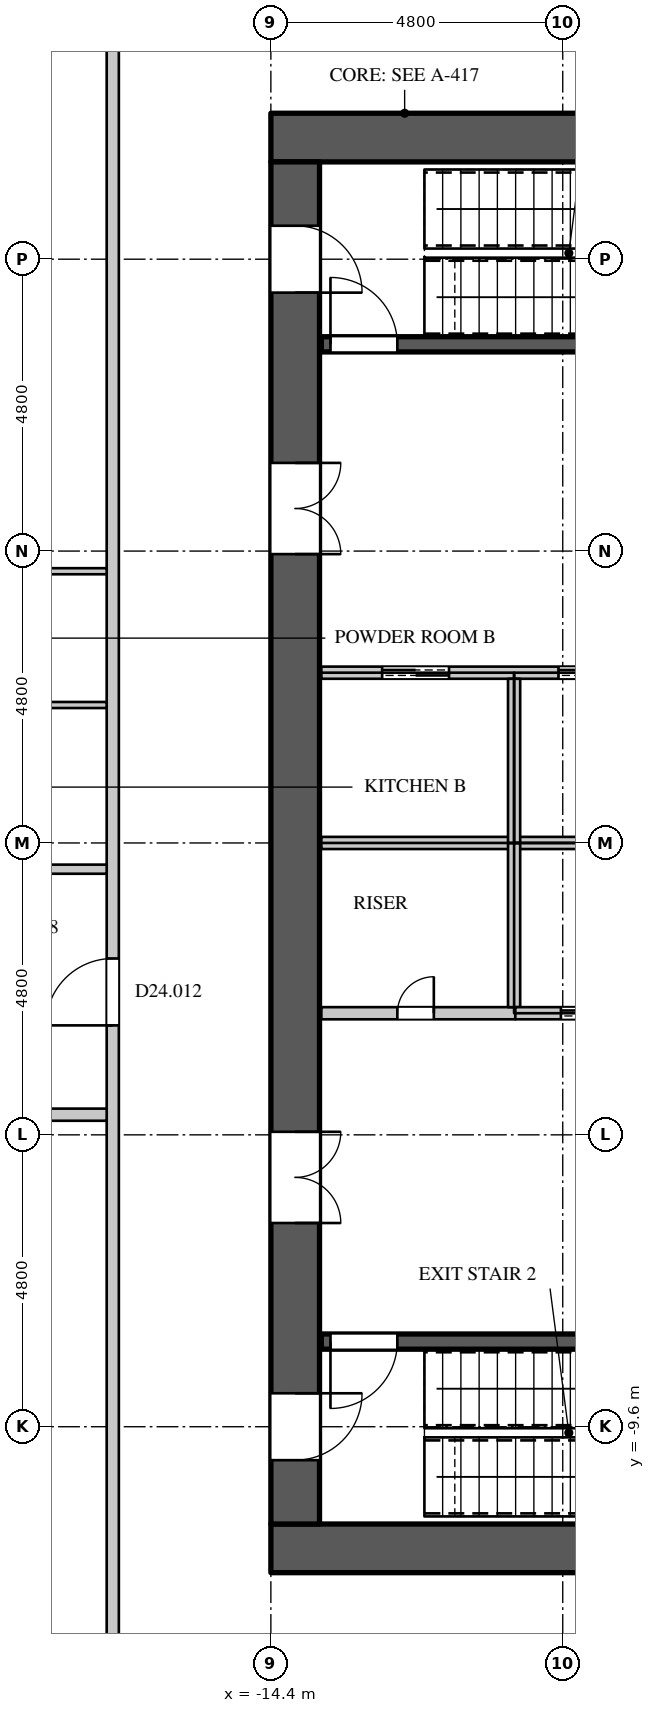
"""IFC4 building model, lengths in metres.
Left out: names, types, materials, properties, quantities, classifications, styles, units other than length and angle.
Written with IfcOpenShell. Run it as: python <this file> out.ifc"""

import sys

from ifc_helpers import new_model, si_unit, direction, frame, frame_2d, origin, place, context, subcontext, project, spatial, rectangle, extrude, element, fill, save


model = new_model("IFC4")
c1 = context("Model", 3, precision=1e-05, world=origin(), true_north=direction((0.0, 1.0)))
c2 = subcontext(c1, "Body", "Model", "MODEL_VIEW")
j1 = project(units=[si_unit("LENGTHUNIT", "METRE"), si_unit("PLANEANGLEUNIT", "RADIAN")], contexts=[c1])
p1 = place(None, origin())
s1 = spatial("IfcSite", under=j1, at=p1, CompositionType="ELEMENT")
p2 = place(p1, origin())
s2 = spatial("IfcBuilding", under=s1, at=p2, CompositionType="ELEMENT")
p3 = place(p2, frame((0.0, 0.0, 106.5)))
s3 = spatial("IfcBuildingStorey", under=s2, at=p3, CompositionType="ELEMENT", Elevation=106.5)
for number, where, z_axis, x_axis in (
    (1, (-14.4, 11.6, 0.0), (0.0, 0.0, 1.0), (1.0, 0.0, 0.0)),
    (2, (-14.4, -11.6, 0.0), (0.0, 0.0, 1.0), (1.0, 0.0, 0.0)),
):
    element("IfcWall", number, at=place(p3, frame(where, z_axis=z_axis, x_axis=x_axis)), inside=s3, PredefinedType="SHEAR", context=c2, shape_type="SweptSolid", body=[
        extrude(rectangle(XDim=28.8, YDim=0.8, at=frame_2d((14.4, 0.0))), origin(), (0.0, 0.0, 1.0), 4.2),
    ])
p4 = place(p3, frame((-14.0, -11.2, 0.0), z_axis=(0.0, 0.0, 1.0), x_axis=(0.0, 1.0, 0.0)))
e3 = element("IfcWall", 3, at=p4, inside=s3, PredefinedType="SHEAR", context=c2, shape_type="SweptSolid", body=[
    extrude(rectangle(XDim=22.4, YDim=0.8, at=frame_2d((11.2, 0.0))), origin(), (0.0, 0.0, 1.0), 4.2),
])
p5 = place(p4, frame((20.25, 0.0, 0.0)))
e4 = element("IfcOpeningElement", 4, at=p5, cuts=e3, PredefinedType="OPENING", context=c2, shape_type="SweptSolid", body=[
    extrude(rectangle(XDim=1.1, YDim=2.2, at=frame_2d((0.55, 1.1))), frame((0.0, 0.41, 0.0), z_axis=(0.0, -1.0, 0.0), x_axis=(1.0, 0.0, 0.0)), (0.0, 0.0, 1.0), 0.82),
])
p6 = place(p4, frame((1.05, 0.0, 0.0)))
e5 = element("IfcOpeningElement", 5, at=p6, cuts=e3, PredefinedType="OPENING", context=c2, shape_type="SweptSolid", body=[
    extrude(rectangle(XDim=1.1, YDim=2.2, at=frame_2d((0.55, 1.1))), frame((0.0, 0.41, 0.0), z_axis=(0.0, -1.0, 0.0), x_axis=(1.0, 0.0, 0.0)), (0.0, 0.0, 1.0), 0.82),
])
p7 = place(p4, frame((15.95, 0.0, 0.0)))
e6 = element("IfcOpeningElement", 6, at=p7, cuts=e3, PredefinedType="OPENING", context=c2, shape_type="SweptSolid", body=[
    extrude(rectangle(XDim=1.5, YDim=2.4, at=frame_2d((0.75, 1.2))), frame((0.0, 0.41, 0.0), z_axis=(0.0, -1.0, 0.0), x_axis=(1.0, 0.0, 0.0)), (0.0, 0.0, 1.0), 0.82),
])
p8 = place(p4, frame((4.95, 0.0, 0.0)))
e7 = element("IfcOpeningElement", 7, at=p8, cuts=e3, PredefinedType="OPENING", context=c2, shape_type="SweptSolid", body=[
    extrude(rectangle(XDim=1.5, YDim=2.4, at=frame_2d((0.75, 1.2))), frame((0.0, 0.41, 0.0), z_axis=(0.0, -1.0, 0.0), x_axis=(1.0, 0.0, 0.0)), (0.0, 0.0, 1.0), 0.82),
])
p9 = place(p3, frame((-17.0, -14.5, 0.0), z_axis=(0.0, 0.0, 1.0), x_axis=(0.0, 1.0, 0.0)))
e8 = element("IfcWall", 8, at=p9, inside=s3, PredefinedType="PARTITIONING", context=c2, shape_type="SweptSolid", body=[
    extrude(rectangle(XDim=29.0, YDim=0.2, at=frame_2d((14.5, 0.0))), origin(), (0.0, 0.0, 1.0), 3.95),
])
p10 = place(p9, frame((11.5, 0.0, 0.0)))
e9 = element("IfcOpeningElement", 9, at=p10, cuts=e8, PredefinedType="OPENING", context=c2, shape_type="SweptSolid", body=[
    extrude(rectangle(XDim=1.1, YDim=2.4, at=frame_2d((0.55, 1.2))), frame((0.0, 0.11, 0.0), z_axis=(0.0, -1.0, 0.0), x_axis=(1.0, 0.0, 0.0)), (0.0, 0.0, 1.0), 0.22),
])
p11 = place(p3, frame((-21.547, -11.471, 0.0), z_axis=(0.0, 0.0, 1.0), x_axis=(0.707106781187, -0.707106781187, 0.0)))
e10 = element("IfcWall", 10, at=p11, inside=s3, PredefinedType="PARTITIONING", context=c2, shape_type="SweptSolid", body=[
    extrude(rectangle(XDim=7.125, YDim=0.15, at=frame_2d((3.562, 0.0))), origin(), (0.0, 0.0, 1.0), 3.95),
])
p12 = place(p11, frame((2.85, 0.0, 0.0)))
e11 = element("IfcOpeningElement", 11, at=p12, cuts=e10, PredefinedType="OPENING", context=c2, shape_type="SweptSolid", body=[
    extrude(rectangle(XDim=0.95, YDim=2.2, at=frame_2d((0.475, 1.1))), frame((0.0, 0.085, 0.0), z_axis=(0.0, -1.0, 0.0), x_axis=(1.0, 0.0, 0.0)), (0.0, 0.0, 1.0), 0.17),
])
p13 = place(p3, frame((-21.547, 11.471, 0.0), z_axis=(0.0, 0.0, 1.0), x_axis=(0.707106781187, 0.707106781187, 0.0)))
e12 = element("IfcWall", 12, at=p13, inside=s3, PredefinedType="PARTITIONING", context=c2, shape_type="SweptSolid", body=[
    extrude(rectangle(XDim=7.05, YDim=0.15, at=frame_2d((3.525, 0.0))), origin(), (0.0, 0.0, 1.0), 3.95),
])
p14 = place(p13, frame((2.85, 0.0, 0.0)))
e13 = element("IfcOpeningElement", 13, at=p14, cuts=e12, PredefinedType="OPENING", context=c2, shape_type="SweptSolid", body=[
    extrude(rectangle(XDim=0.95, YDim=2.2, at=frame_2d((0.475, 1.1))), frame((0.0, 0.085, 0.0), z_axis=(0.0, -1.0, 0.0), x_axis=(1.0, 0.0, 0.0)), (0.0, 0.0, 1.0), 0.17),
])
p15 = place(p3, frame((-20.725, -0.431, 0.0), z_axis=(0.0, 0.0, 1.0), x_axis=(1.0, 0.0, 0.0)))
e14 = element("IfcWall", 14, at=p15, inside=s3, PredefinedType="PARTITIONING", context=c2, shape_type="SweptSolid", body=[
    extrude(rectangle(XDim=3.625, YDim=0.15, at=frame_2d((1.812, 0.0))), origin(), (0.0, 0.0, 1.0), 3.95),
])
p16 = place(p15, frame((0.85, 0.0, 0.0)))
e15 = element("IfcOpeningElement", 15, at=p16, cuts=e14, PredefinedType="OPENING", context=c2, shape_type="SweptSolid", body=[
    extrude(rectangle(XDim=0.95, YDim=2.2, at=frame_2d((0.475, 1.1))), frame((0.0, 0.085, 0.0), z_axis=(0.0, -1.0, 0.0), x_axis=(1.0, 0.0, 0.0)), (0.0, 0.0, 1.0), 0.17),
])
p17 = place(p3, frame((-25.65, -4.469, 0.0), z_axis=(0.0, 0.0, 1.0), x_axis=(1.0, 0.0, 0.0)))
e16 = element("IfcWall", 16, at=p17, inside=s3, PredefinedType="PARTITIONING", context=c2, shape_type="SweptSolid", body=[
    extrude(rectangle(XDim=8.55, YDim=0.2, at=frame_2d((4.275, 0.0))), origin(), (0.0, 0.0, 1.0), 3.3),
])
p18 = place(p3, frame((-13.57, -2.8, 0.0), z_axis=(0.0, 0.0, 1.0), x_axis=(1.0, 0.0, 0.0)))
e17 = element("IfcWall", 17, at=p18, inside=s3, PredefinedType="PARTITIONING", context=c2, shape_type="SweptSolid", body=[
    extrude(rectangle(XDim=3.19, YDim=0.2, at=frame_2d((1.595, 0.0))), origin(), (0.0, 0.0, 1.0), 3.95),
])
p19 = place(p18, frame((1.25, 0.0, 0.0)))
e18 = element("IfcOpeningElement", 18, at=p19, cuts=e17, PredefinedType="OPENING", context=c2, shape_type="SweptSolid", body=[
    extrude(rectangle(XDim=0.6, YDim=2.0, at=frame_2d((0.3, 1.0))), frame((0.0, 0.11, 0.0), z_axis=(0.0, -1.0, 0.0), x_axis=(1.0, 0.0, 0.0)), (0.0, 0.0, 1.0), 0.22),
])
p20 = place(p3, frame((-13.57, 0.0, 0.0), z_axis=(0.0, 0.0, 1.0), x_axis=(1.0, 0.0, 0.0)))
e19 = element("IfcWall", 19, at=p20, inside=s3, PredefinedType="PARTITIONING", context=c2, shape_type="SweptSolid", body=[
    extrude(rectangle(XDim=23.97, YDim=0.2, at=frame_2d((11.985, 0.0))), origin(), (0.0, 0.0, 1.0), 3.95),
])
p21 = place(p3, frame((-13.57, 2.8, 0.0), z_axis=(0.0, 0.0, 1.0), x_axis=(1.0, 0.0, 0.0)))
e20 = element("IfcWall", 20, at=p21, inside=s3, PredefinedType="PARTITIONING", context=c2, shape_type="SweptSolid", body=[
    extrude(rectangle(XDim=23.97, YDim=0.2, at=frame_2d((11.985, 0.0))), origin(), (0.0, 0.0, 1.0), 3.95),
])
p22 = place(p21, frame((1.0, 0.0, 0.0)))
e21 = element("IfcOpeningElement", 21, at=p22, cuts=e20, PredefinedType="OPENING", context=c2, shape_type="SweptSolid", body=[
    extrude(rectangle(XDim=1.1, YDim=2.2, at=frame_2d((0.55, 1.1))), frame((0.0, 0.11, 0.0), z_axis=(0.0, -1.0, 0.0), x_axis=(1.0, 0.0, 0.0)), (0.0, 0.0, 1.0), 0.22),
])
p23 = place(p21, frame((3.9, 0.0, 0.0)))
e22 = element("IfcOpeningElement", 22, at=p23, cuts=e20, PredefinedType="OPENING", context=c2, shape_type="SweptSolid", body=[
    extrude(rectangle(XDim=1.1, YDim=2.2, at=frame_2d((0.55, 1.1))), frame((0.0, 0.11, 0.0), z_axis=(0.0, -1.0, 0.0), x_axis=(1.0, 0.0, 0.0)), (0.0, 0.0, 1.0), 0.22),
])
p24 = place(p21, frame((6.5, 0.0, 0.0)))
e23 = element("IfcOpeningElement", 23, at=p24, cuts=e20, PredefinedType="OPENING", context=c2, shape_type="SweptSolid", body=[
    extrude(rectangle(XDim=1.1, YDim=2.2, at=frame_2d((0.55, 1.1))), frame((0.0, 0.11, 0.0), z_axis=(0.0, -1.0, 0.0), x_axis=(1.0, 0.0, 0.0)), (0.0, 0.0, 1.0), 0.22),
])
p25 = place(p21, frame((9.1, 0.0, 0.0)))
e24 = element("IfcOpeningElement", 24, at=p25, cuts=e20, PredefinedType="OPENING", context=c2, shape_type="SweptSolid", body=[
    extrude(rectangle(XDim=1.1, YDim=2.2, at=frame_2d((0.55, 1.1))), frame((0.0, 0.11, 0.0), z_axis=(0.0, -1.0, 0.0), x_axis=(1.0, 0.0, 0.0)), (0.0, 0.0, 1.0), 0.22),
])
p26 = place(p21, frame((11.7, 0.0, 0.0)))
e25 = element("IfcOpeningElement", 25, at=p26, cuts=e20, PredefinedType="OPENING", context=c2, shape_type="SweptSolid", body=[
    extrude(rectangle(XDim=1.1, YDim=2.2, at=frame_2d((0.55, 1.1))), frame((0.0, 0.11, 0.0), z_axis=(0.0, -1.0, 0.0), x_axis=(1.0, 0.0, 0.0)), (0.0, 0.0, 1.0), 0.22),
])
p27 = place(p21, frame((14.3, 0.0, 0.0)))
e26 = element("IfcOpeningElement", 26, at=p27, cuts=e20, PredefinedType="OPENING", context=c2, shape_type="SweptSolid", body=[
    extrude(rectangle(XDim=1.1, YDim=2.2, at=frame_2d((0.55, 1.1))), frame((0.0, 0.11, 0.0), z_axis=(0.0, -1.0, 0.0), x_axis=(1.0, 0.0, 0.0)), (0.0, 0.0, 1.0), 0.22),
])
p28 = place(p21, frame((16.9, 0.0, 0.0)))
e27 = element("IfcOpeningElement", 27, at=p28, cuts=e20, PredefinedType="OPENING", context=c2, shape_type="SweptSolid", body=[
    extrude(rectangle(XDim=1.1, YDim=2.2, at=frame_2d((0.55, 1.1))), frame((0.0, 0.11, 0.0), z_axis=(0.0, -1.0, 0.0), x_axis=(1.0, 0.0, 0.0)), (0.0, 0.0, 1.0), 0.22),
])
p29 = place(p21, frame((19.5, 0.0, 0.0)))
e28 = element("IfcOpeningElement", 28, at=p29, cuts=e20, PredefinedType="OPENING", context=c2, shape_type="SweptSolid", body=[
    extrude(rectangle(XDim=1.1, YDim=2.2, at=frame_2d((0.55, 1.1))), frame((0.0, 0.11, 0.0), z_axis=(0.0, -1.0, 0.0), x_axis=(1.0, 0.0, 0.0)), (0.0, 0.0, 1.0), 0.22),
])
p30 = place(p3, frame((-10.4, -2.7, 0.0), z_axis=(0.0, 0.0, 1.0), x_axis=(0.0, 1.0, 0.0)))
e29 = element("IfcWall", 29, at=p30, inside=s3, PredefinedType="PARTITIONING", context=c2, shape_type="SweptSolid", body=[
    extrude(rectangle(XDim=2.7, YDim=0.2, at=frame_2d((1.35, 0.0))), origin(), (0.0, 0.0, 1.0), 3.95),
])
p31 = place(p3, frame((-10.38, -2.8, 0.0), z_axis=(0.0, 0.0, 1.0), x_axis=(1.0, 0.0, 0.0)))
e30 = element("IfcWall", 30, at=p31, inside=s3, PredefinedType="PARTITIONING", context=c2, shape_type="SweptSolid", body=[
    extrude(rectangle(XDim=2.56, YDim=0.2, at=frame_2d((1.28, 0.0))), origin(), (0.0, 0.0, 1.0), 3.95),
])
p32 = place(p31, frame((0.75, 0.0, 0.0)))
e31 = element("IfcOpeningElement", 31, at=p32, cuts=e30, PredefinedType="OPENING", context=c2, shape_type="SweptSolid", body=[
    extrude(rectangle(XDim=1.1, YDim=2.2, at=frame_2d((0.55, 1.1))), frame((0.0, 0.11, 0.0), z_axis=(0.0, -1.0, 0.0), x_axis=(1.0, 0.0, 0.0)), (0.0, 0.0, 1.0), 0.22),
])
p33 = place(p3, frame((-10.4, 0.0, 0.0), z_axis=(0.0, 0.0, 1.0), x_axis=(0.0, 1.0, 0.0)))
e32 = element("IfcWall", 32, at=p33, inside=s3, PredefinedType="PARTITIONING", context=c2, shape_type="SweptSolid", body=[
    extrude(rectangle(XDim=2.7, YDim=0.2, at=frame_2d((1.35, 0.0))), origin(), (0.0, 0.0, 1.0), 3.95),
])
p34 = place(p3, frame((-13.57, -8.2, 0.0), z_axis=(0.0, 0.0, 1.0), x_axis=(1.0, 0.0, 0.0)))
e33 = element("IfcWall", 33, at=p34, inside=s3, PredefinedType="SHEAR", context=c2, shape_type="SweptSolid", body=[
    extrude(rectangle(XDim=8.295, YDim=0.25, at=frame_2d((4.147, 0.0))), origin(), (0.0, 0.0, 1.0), 3.95),
])
p35 = place(p34, frame((0.15, 0.0, 0.0)))
e34 = element("IfcOpeningElement", 34, at=p35, cuts=e33, PredefinedType="OPENING", context=c2, shape_type="SweptSolid", body=[
    extrude(rectangle(XDim=1.1, YDim=2.2, at=frame_2d((0.55, 1.1))), frame((0.0, 0.135, 0.0), z_axis=(0.0, -1.0, 0.0), x_axis=(1.0, 0.0, 0.0)), (0.0, 0.0, 1.0), 0.27),
])
p36 = place(p3, frame((-13.57, 8.2, 0.0), z_axis=(0.0, 0.0, 1.0), x_axis=(1.0, 0.0, 0.0)))
e35 = element("IfcWall", 35, at=p36, inside=s3, PredefinedType="SHEAR", context=c2, shape_type="SweptSolid", body=[
    extrude(rectangle(XDim=8.295, YDim=0.25, at=frame_2d((4.147, 0.0))), origin(), (0.0, 0.0, 1.0), 3.95),
])
p37 = place(p36, frame((0.15, 0.0, 0.0)))
e36 = element("IfcOpeningElement", 36, at=p37, cuts=e35, PredefinedType="OPENING", context=c2, shape_type="SweptSolid", body=[
    extrude(rectangle(XDim=1.1, YDim=2.2, at=frame_2d((0.55, 1.1))), frame((0.0, 0.135, 0.0), z_axis=(0.0, -1.0, 0.0), x_axis=(1.0, 0.0, 0.0)), (0.0, 0.0, 1.0), 0.27),
])
p38 = place(p3, frame((-20.78, 4.469, 0.0), z_axis=(0.0, 0.0, 1.0), x_axis=(1.0, 0.0, 0.0)))
e37 = element("IfcWall", 37, at=p38, inside=s3, PredefinedType="PARTITIONING", context=c2, shape_type="SweptSolid", body=[
    extrude(rectangle(XDim=3.68, YDim=0.1, at=frame_2d((1.84, 0.0))), origin(), (0.0, 0.0, 1.0), 3.3),
])
p39 = place(p38, frame((0.95, 0.0, 0.0)))
e38 = element("IfcOpeningElement", 38, at=p39, cuts=e37, PredefinedType="OPENING", context=c2, shape_type="SweptSolid", body=[
    extrude(rectangle(XDim=0.9, YDim=2.2, at=frame_2d((0.45, 1.1))), frame((0.0, 0.06, 0.0), z_axis=(0.0, -1.0, 0.0), x_axis=(1.0, 0.0, 0.0)), (0.0, 0.0, 1.0), 0.12),
])
p40 = place(p3, frame((-20.725, 2.269, 0.0), z_axis=(0.0, 0.0, 1.0), x_axis=(1.0, 0.0, 0.0)))
e39 = element("IfcWall", 39, at=p40, inside=s3, PredefinedType="PARTITIONING", context=c2, shape_type="SweptSolid", body=[
    extrude(rectangle(XDim=3.625, YDim=0.1, at=frame_2d((1.812, 0.0))), origin(), (0.0, 0.0, 1.0), 3.95),
])
p41 = place(p19, origin())
e40 = element("IfcDoor", 40, at=p41, inside=s3, OperationType="SINGLE_SWING_RIGHT", PredefinedType="DOOR", context=c2, shape_type="SweptSolid", body=[
    extrude(rectangle(XDim=0.6, YDim=2.0, at=frame_2d((0.3, 1.0))), frame((0.0, 0.025, 0.0), z_axis=(0.0, -1.0, 0.0), x_axis=(1.0, 0.0, 0.0)), (0.0, 0.0, 1.0), 0.05),
])
fill(e18, e40)
p42 = place(p22, origin())
e41 = element("IfcDoor", 41, at=p42, inside=s3, OperationType="DOUBLE_DOOR_SLIDING", PredefinedType="DOOR", context=c2, shape_type="SweptSolid", body=[
    extrude(rectangle(XDim=1.1, YDim=2.2, at=frame_2d((0.55, 1.1))), frame((0.0, 0.025, 0.0), z_axis=(0.0, -1.0, 0.0), x_axis=(1.0, 0.0, 0.0)), (0.0, 0.0, 1.0), 0.05),
])
fill(e21, e41)
p43 = place(p23, origin())
e42 = element("IfcDoor", 42, at=p43, inside=s3, OperationType="DOUBLE_DOOR_SLIDING", PredefinedType="DOOR", context=c2, shape_type="SweptSolid", body=[
    extrude(rectangle(XDim=1.1, YDim=2.2, at=frame_2d((0.55, 1.1))), frame((0.0, 0.025, 0.0), z_axis=(0.0, -1.0, 0.0), x_axis=(1.0, 0.0, 0.0)), (0.0, 0.0, 1.0), 0.05),
])
fill(e22, e42)
p44 = place(p32, origin())
e43 = element("IfcDoor", 43, at=p44, inside=s3, OperationType="DOUBLE_DOOR_SLIDING", PredefinedType="DOOR", context=c2, shape_type="SweptSolid", body=[
    extrude(rectangle(XDim=1.1, YDim=2.2, at=frame_2d((0.55, 1.1))), frame((0.0, 0.025, 0.0), z_axis=(0.0, -1.0, 0.0), x_axis=(1.0, 0.0, 0.0)), (0.0, 0.0, 1.0), 0.05),
])
fill(e31, e43)
p45 = place(p37, origin())
e44 = element("IfcDoor", 44, at=p45, inside=s3, OperationType="SINGLE_SWING_LEFT", PredefinedType="DOOR", context=c2, shape_type="SweptSolid", body=[
    extrude(rectangle(XDim=1.1, YDim=2.2, at=frame_2d((0.55, 1.1))), frame((0.0, 0.025, 0.0), z_axis=(0.0, -1.0, 0.0), x_axis=(1.0, 0.0, 0.0)), (0.0, 0.0, 1.0), 0.05),
])
fill(e36, e44)
p46 = place(p35, origin())
e45 = element("IfcDoor", 45, at=p46, inside=s3, OperationType="SINGLE_SWING_RIGHT", PredefinedType="DOOR", context=c2, shape_type="SweptSolid", body=[
    extrude(rectangle(XDim=1.1, YDim=2.2, at=frame_2d((0.55, 1.1))), frame((0.0, 0.025, 0.0), z_axis=(0.0, -1.0, 0.0), x_axis=(1.0, 0.0, 0.0)), (0.0, 0.0, 1.0), 0.05),
])
fill(e34, e45)
p47 = place(p5, origin())
e46 = element("IfcDoor", 46, at=p47, inside=s3, OperationType="SINGLE_SWING_RIGHT", PredefinedType="DOOR", context=c2, shape_type="SweptSolid", body=[
    extrude(rectangle(XDim=1.1, YDim=2.2, at=frame_2d((0.55, 1.1))), frame((0.0, -0.345, 0.0), z_axis=(0.0, -1.0, 0.0), x_axis=(1.0, 0.0, 0.0)), (0.0, 0.0, 1.0), 0.05),
])
fill(e4, e46)
p48 = place(p6, origin())
e47 = element("IfcDoor", 47, at=p48, inside=s3, OperationType="SINGLE_SWING_LEFT", PredefinedType="DOOR", context=c2, shape_type="SweptSolid", body=[
    extrude(rectangle(XDim=1.1, YDim=2.2, at=frame_2d((0.55, 1.1))), frame((0.0, -0.345, 0.0), z_axis=(0.0, -1.0, 0.0), x_axis=(1.0, 0.0, 0.0)), (0.0, 0.0, 1.0), 0.05),
])
fill(e5, e47)
p49 = place(p7, origin())
e48 = element("IfcDoor", 48, at=p49, inside=s3, OperationType="DOUBLE_DOOR_SINGLE_SWING", PredefinedType="DOOR", context=c2, shape_type="SweptSolid", body=[
    extrude(rectangle(XDim=1.5, YDim=2.4, at=frame_2d((0.75, 1.2))), frame((0.0, -0.345, 0.0), z_axis=(0.0, -1.0, 0.0), x_axis=(1.0, 0.0, 0.0)), (0.0, 0.0, 1.0), 0.05),
])
fill(e6, e48)
p50 = place(p8, origin())
e49 = element("IfcDoor", 49, at=p50, inside=s3, OperationType="DOUBLE_DOOR_SINGLE_SWING", PredefinedType="DOOR", context=c2, shape_type="SweptSolid", body=[
    extrude(rectangle(XDim=1.5, YDim=2.4, at=frame_2d((0.75, 1.2))), frame((0.0, -0.345, 0.0), z_axis=(0.0, -1.0, 0.0), x_axis=(1.0, 0.0, 0.0)), (0.0, 0.0, 1.0), 0.05),
])
fill(e7, e49)
p51 = place(p10, origin())
e50 = element("IfcDoor", 50, at=p51, inside=s3, OperationType="SINGLE_SWING_LEFT", PredefinedType="DOOR", context=c2, shape_type="SweptSolid", body=[
    extrude(rectangle(XDim=1.1, YDim=2.4, at=frame_2d((0.55, 1.2))), frame((0.0, 0.025, 0.0), z_axis=(0.0, -1.0, 0.0), x_axis=(1.0, 0.0, 0.0)), (0.0, 0.0, 1.0), 0.05),
])
fill(e9, e50)
save(model, sys.argv[1])
